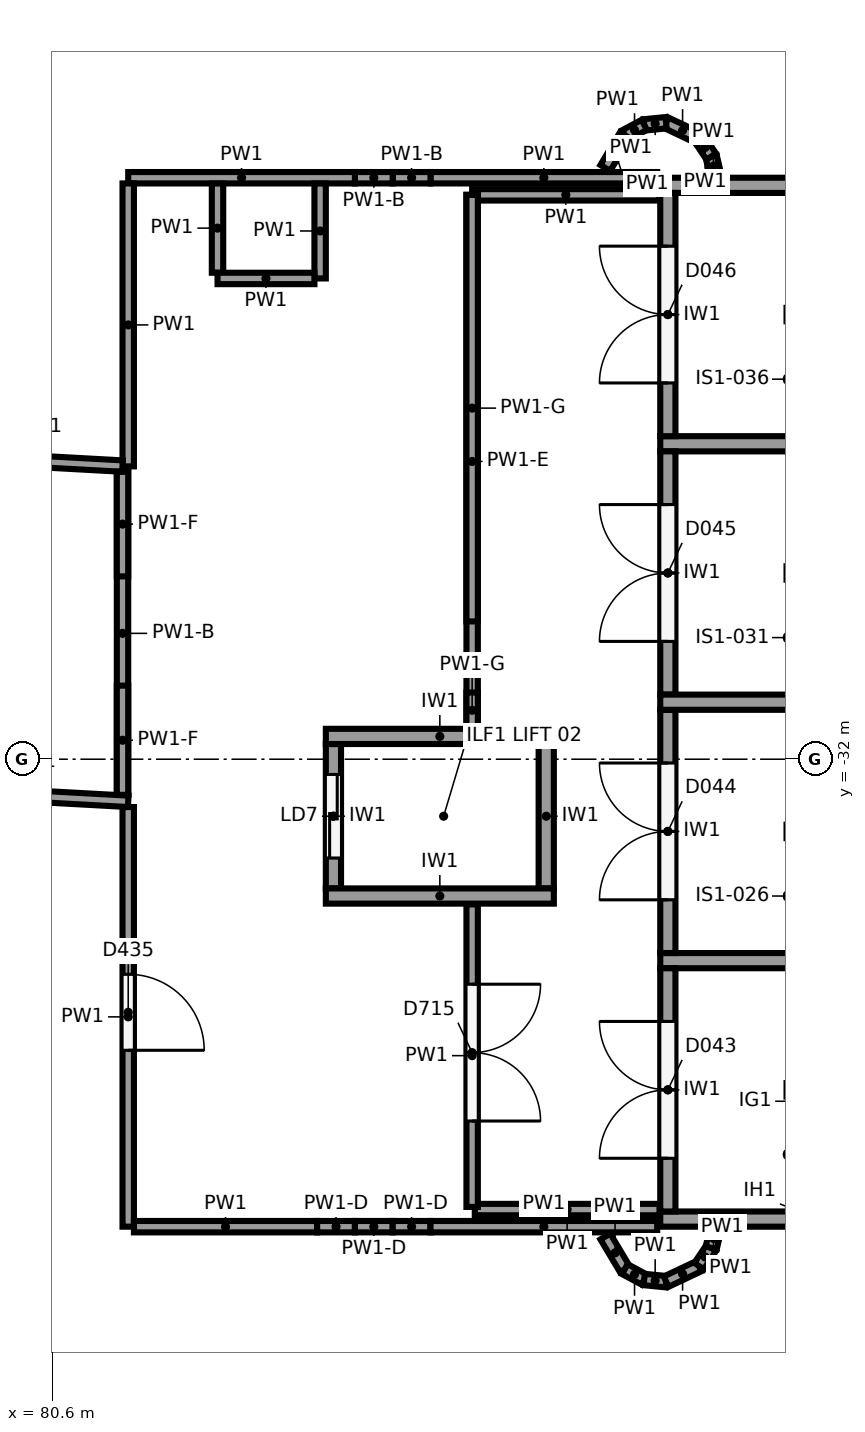
"""IFC4 building model, lengths in metres.
Left out: names, types, materials, properties, quantities, classifications, styles, units other than length and angle.
Written with IfcOpenShell. Run it as: python <this file> out.ifc"""

import sys

from ifc_helpers import new_model, si_unit, direction, frame, frame_2d, origin, origin_2d, place, context, subcontext, project, spatial, rectangle, circle, extrude, element, fill, save


model = new_model("IFC4")
c1 = context("Model", 3, precision=1e-05, world=origin(), true_north=direction((0.0, 1.0)))
c2 = subcontext(c1, "Body", "Model", "MODEL_VIEW")
j1 = project(units=[si_unit("LENGTHUNIT", "METRE"), si_unit("PLANEANGLEUNIT", "RADIAN")], contexts=[c1])
p1 = place(None, origin())
s1 = spatial("IfcSite", under=j1, at=p1, CompositionType="ELEMENT")
p2 = place(p1, origin())
s2 = spatial("IfcBuilding", under=s1, at=p2, CompositionType="ELEMENT")
p3 = place(p2, frame((0.0, 0.0, -4.0)))
s3 = spatial("IfcBuildingStorey", under=s2, at=p3, CompositionType="ELEMENT", Elevation=-4.0)
p4 = place(p3, frame((84.941, -30.404, -1.2), z_axis=(0.0, 0.0, 1.0), x_axis=(1.0, 0.0, 0.0)))
e1 = element("IfcColumn", 1, at=p4, inside=s3, PredefinedType="COLUMN", context=c2, shape_type="SweptSolid", body=[
    extrude(circle(Radius=0.6, at=origin_2d()), origin(), (0.0, 0.0, 1.0), 5.2),
])
for number, where, z_axis, x_axis in (
    (2, (97.6, -38.05, -1.2), (0.0, 0.0, 1.0), (-1.0, 0.0, 0.0)),
    (3, (97.6, -31.25, -1.2), (0.0, 0.0, 1.0), (-1.0, 0.0, 0.0)),
    (4, (97.6, -24.45, -1.2), (0.0, 0.0, 1.0), (-1.0, 0.0, 0.0)),
    (5, (97.6, -34.65, -1.2), (0.0, 0.0, 1.0), (-1.0, 0.0, 0.0)),
    (6, (97.6, -27.85, -1.2), (0.0, 0.0, 1.0), (-1.0, 0.0, 0.0)),
):
    element("IfcWall", number, at=place(p3, frame(where, z_axis=z_axis, x_axis=x_axis)), inside=s3, PredefinedType="SHEAR", context=c2, shape_type="SweptSolid", body=[
        extrude(rectangle(XDim=9.0, YDim=0.2, at=frame_2d((4.5, 0.0))), origin(), (0.0, 0.0, 1.0), 4.8),
    ])
p5 = place(p3, frame((88.7, -37.95, -1.2), z_axis=(0.0, 0.0, 1.0), x_axis=(0.0, 1.0, 0.0)))
e7 = element("IfcWall", 7, at=p5, inside=s3, PredefinedType="SHEAR", context=c2, shape_type="SweptSolid", body=[
    extrude(rectangle(XDim=3.2, YDim=0.2, at=frame_2d((1.6, 0.0))), origin(), (0.0, 0.0, 1.0), 4.8),
])
p6 = place(p5, frame((0.7, 0.0, 1.2)))
e8 = element("IfcOpeningElement", 8, at=p6, cuts=e7, PredefinedType="OPENING", context=c2, shape_type="SweptSolid", body=[
    extrude(rectangle(XDim=1.8, YDim=2.1, at=frame_2d((0.9, 1.05))), frame((0.0, 0.11, 0.0), z_axis=(0.0, -1.0, 0.0), x_axis=(1.0, 0.0, 0.0)), (0.0, 0.0, 1.0), 0.22),
])
p7 = place(p3, frame((88.7, -34.55, -1.2), z_axis=(0.0, 0.0, 1.0), x_axis=(0.0, 1.0, 0.0)))
e9 = element("IfcWall", 9, at=p7, inside=s3, PredefinedType="SHEAR", context=c2, shape_type="SweptSolid", body=[
    extrude(rectangle(XDim=3.2, YDim=0.2, at=frame_2d((1.6, 0.0))), origin(), (0.0, 0.0, 1.0), 4.8),
])
p8 = place(p7, frame((0.7, 0.0, 1.2)))
e10 = element("IfcOpeningElement", 10, at=p8, cuts=e9, PredefinedType="OPENING", context=c2, shape_type="SweptSolid", body=[
    extrude(rectangle(XDim=1.8, YDim=2.1, at=frame_2d((0.9, 1.05))), frame((0.0, 0.11, 0.0), z_axis=(0.0, -1.0, 0.0), x_axis=(1.0, 0.0, 0.0)), (0.0, 0.0, 1.0), 0.22),
])
p9 = place(p3, frame((88.7, -31.15, -1.2), z_axis=(0.0, 0.0, 1.0), x_axis=(0.0, 1.0, 0.0)))
e11 = element("IfcWall", 11, at=p9, inside=s3, PredefinedType="SHEAR", context=c2, shape_type="SweptSolid", body=[
    extrude(rectangle(XDim=3.2, YDim=0.2, at=frame_2d((1.6, 0.0))), origin(), (0.0, 0.0, 1.0), 4.8),
])
p10 = place(p9, frame((0.7, 0.0, 1.2)))
e12 = element("IfcOpeningElement", 12, at=p10, cuts=e11, PredefinedType="OPENING", context=c2, shape_type="SweptSolid", body=[
    extrude(rectangle(XDim=1.8, YDim=2.1, at=frame_2d((0.9, 1.05))), frame((0.0, 0.11, 0.0), z_axis=(0.0, -1.0, 0.0), x_axis=(1.0, 0.0, 0.0)), (0.0, 0.0, 1.0), 0.22),
])
p11 = place(p3, frame((88.7, -27.75, -1.2), z_axis=(0.0, 0.0, 1.0), x_axis=(0.0, 1.0, 0.0)))
e13 = element("IfcWall", 13, at=p11, inside=s3, PredefinedType="SHEAR", context=c2, shape_type="SweptSolid", body=[
    extrude(rectangle(XDim=3.2, YDim=0.2, at=frame_2d((1.6, 0.0))), origin(), (0.0, 0.0, 1.0), 4.8),
])
p12 = place(p11, frame((0.7, 0.0, 1.2)))
e14 = element("IfcOpeningElement", 14, at=p12, cuts=e13, PredefinedType="OPENING", context=c2, shape_type="SweptSolid", body=[
    extrude(rectangle(XDim=1.8, YDim=2.1, at=frame_2d((0.9, 1.05))), frame((0.0, 0.11, 0.0), z_axis=(0.0, -1.0, 0.0), x_axis=(1.0, 0.0, 0.0)), (0.0, 0.0, 1.0), 0.22),
])
for number, where, z_axis, x_axis in (
    (15, (87.2, -33.8, -1.2), (0.0, 0.0, 1.0), (-1.0, 0.0, 0.0)),
    (16, (87.2, -31.7, -1.2), (0.0, 0.0, 1.0), (-1.0, 0.0, 0.0)),
):
    element("IfcWall", number, at=place(p3, frame(where, z_axis=z_axis, x_axis=x_axis)), inside=s3, PredefinedType="SHEAR", context=c2, shape_type="SweptSolid", body=[
        extrude(rectangle(XDim=3.0, YDim=0.2, at=frame_2d((1.5, 0.0))), origin(), (0.0, 0.0, 1.0), 4.8),
    ])
p13 = place(p3, frame((87.1, -33.7, -1.2), z_axis=(0.0, 0.0, 1.0), x_axis=(0.0, 1.0, 0.0)))
e17 = element("IfcWall", 17, at=p13, inside=s3, PredefinedType="SHEAR", context=c2, shape_type="SweptSolid", body=[
    extrude(rectangle(XDim=1.9, YDim=0.2, at=frame_2d((0.95, 0.0))), origin(), (0.0, 0.0, 1.0), 4.8),
])
p14 = place(p3, frame((84.3, -33.7, -1.2), z_axis=(0.0, 0.0, 1.0), x_axis=(0.0, 1.0, 0.0)))
e18 = element("IfcWall", 18, at=p14, inside=s3, PredefinedType="SHEAR", context=c2, shape_type="SweptSolid", body=[
    extrude(rectangle(XDim=1.9, YDim=0.2, at=frame_2d((0.95, 0.0))), origin(), (0.0, 0.0, 1.0), 4.8),
])
p15 = place(p14, frame((0.4, 0.0, 1.2)))
e19 = element("IfcOpeningElement", 19, at=p15, cuts=e18, PredefinedType="OPENING", context=c2, shape_type="SweptSolid", body=[
    extrude(rectangle(XDim=1.1, YDim=2.1, at=frame_2d((0.55, 1.05))), frame((0.0, 0.11, 0.0), z_axis=(0.0, -1.0, 0.0), x_axis=(1.0, 0.0, 0.0)), (0.0, 0.0, 1.0), 0.22),
])
p16 = place(p3, frame((79.122, -32.418, 0.0), z_axis=(0.0, 0.0, 1.0), x_axis=(0.998497362752, -0.05479978629, 0.0)))
e20 = element("IfcWall", 20, at=p16, inside=s3, PredefinedType="PARTITIONING", context=c2, shape_type="SweptSolid", body=[
    extrude(rectangle(XDim=2.481, YDim=0.15, at=frame_2d((1.241, 0.0))), origin(), (0.0, 0.0, 1.0), 3.6),
])
p17 = place(p3, frame((81.6, -32.629, 0.0), z_axis=(0.0, 0.0, 1.0), x_axis=(0.0, -1.0, 0.0)))
e21 = element("IfcWall", 21, at=p17, inside=s3, PredefinedType="PARTITIONING", context=c2, shape_type="SweptSolid", body=[
    extrude(rectangle(XDim=5.521, YDim=0.15, at=frame_2d((2.76, 0.0))), origin(), (0.0, 0.0, 1.0), 3.6),
])
p18 = place(p17, frame((2.2, 0.0, 0.0)))
e22 = element("IfcOpeningElement", 22, at=p18, cuts=e21, PredefinedType="OPENING", context=c2, shape_type="SweptSolid", body=[
    extrude(rectangle(XDim=1.0, YDim=2.1, at=frame_2d((0.5, 1.05))), frame((0.0, 0.085, 0.0), z_axis=(0.0, -1.0, 0.0), x_axis=(1.0, 0.0, 0.0)), (0.0, 0.0, 1.0), 0.17),
])
p19 = place(p3, frame((81.675, -38.15, 0.0), z_axis=(0.0, 0.0, 1.0), x_axis=(1.0, 0.0, 0.0)))
e23 = element("IfcWall", 23, at=p19, inside=s3, PredefinedType="PARTITIONING", context=c2, shape_type="SweptSolid", body=[
    extrude(rectangle(XDim=2.411, YDim=0.15, at=frame_2d((1.205, 0.0))), origin(), (0.0, 0.0, 1.0), 3.6),
])
p20 = place(p3, frame((84.086, -38.15, 0.0), z_axis=(0.0, 0.0, 1.0), x_axis=(1.0, 0.0, 0.0)))
e24 = element("IfcWall", 24, at=p20, inside=s3, PredefinedType="PARTITIONING", context=c2, shape_type="SweptSolid", body=[
    extrude(rectangle(XDim=0.497, YDim=0.15, at=frame_2d((0.249, 0.0))), origin(), (0.0, 0.0, 1.0), 2.3),
])
for number, where, z_axis, x_axis in (
    (25, (84.583, -38.15, 0.0), (0.0, 0.0, 1.0), (1.0, 0.0, 0.0)),
    (26, (85.08, -38.15, 0.0), (0.0, 0.0, 1.0), (1.0, 0.0, 0.0)),
):
    element("IfcWall", number, at=place(p3, frame(where, z_axis=z_axis, x_axis=x_axis)), inside=s3, PredefinedType="PARTITIONING", context=c2, shape_type="SweptSolid", body=[
        extrude(rectangle(XDim=0.497, YDim=0.15, at=frame_2d((0.249, 0.0))), origin(), (0.0, 0.0, 1.0), 2.3),
    ])
for number, where, z_axis, x_axis in (
    (27, (85.577, -38.15, 0.0), (0.0, 0.0, 1.0), (1.0, 0.0, 0.0)),
    (28, (88.56, -24.35, 0.0), (0.0, 0.0, 1.0), (-1.0, 0.0, 0.0)),
):
    element("IfcWall", number, at=place(p3, frame(where, z_axis=z_axis, x_axis=x_axis)), inside=s3, PredefinedType="PARTITIONING", context=c2, shape_type="SweptSolid", body=[
        extrude(rectangle(XDim=2.983, YDim=0.15, at=frame_2d((1.491, 0.0))), origin(), (0.0, 0.0, 1.0), 3.6),
    ])
for number, where, z_axis, x_axis in (
    (29, (85.577, -24.35, 0.0), (0.0, 0.0, 1.0), (-1.0, 0.0, 0.0)),
    (30, (85.08, -24.35, 0.0), (0.0, 0.0, 1.0), (-1.0, 0.0, 0.0)),
):
    element("IfcWall", number, at=place(p3, frame(where, z_axis=z_axis, x_axis=x_axis)), inside=s3, PredefinedType="PARTITIONING", context=c2, shape_type="SweptSolid", body=[
        extrude(rectangle(XDim=0.497, YDim=0.15, at=frame_2d((0.249, 0.0))), origin(), (0.0, 0.0, 1.0), 2.5),
    ])
p21 = place(p3, frame((84.583, -24.35, 0.0), z_axis=(0.0, 0.0, 1.0), x_axis=(-1.0, 0.0, 0.0)))
e31 = element("IfcWall", 31, at=p21, inside=s3, PredefinedType="PARTITIONING", context=c2, shape_type="SweptSolid", body=[
    extrude(rectangle(XDim=2.983, YDim=0.15, at=frame_2d((1.491, 0.0))), origin(), (0.0, 0.0, 1.0), 3.6),
])
p22 = place(p3, frame((81.6, -24.425, 0.0), z_axis=(0.0, 0.0, 1.0), x_axis=(0.0, -1.0, 0.0)))
e32 = element("IfcWall", 32, at=p22, inside=s3, PredefinedType="PARTITIONING", context=c2, shape_type="SweptSolid", body=[
    extrude(rectangle(XDim=3.723, YDim=0.15, at=frame_2d((1.861, 0.0))), origin(), (0.0, 0.0, 1.0), 3.6),
])
p23 = place(p3, frame((81.525, -28.144, 0.0), z_axis=(0.0, 0.0, 1.0), x_axis=(-0.998497253929, 0.054801769103, 0.0)))
e33 = element("IfcWall", 33, at=p23, inside=s3, PredefinedType="PARTITIONING", context=c2, shape_type="SweptSolid", body=[
    extrude(rectangle(XDim=2.165, YDim=0.15, at=frame_2d((1.083, 0.0))), origin(), (0.0, 0.0, 1.0), 3.6),
])
p24 = place(p3, frame((84.125, -25.675, 0.0), z_axis=(0.0, 0.0, 1.0), x_axis=(0.0, 1.0, 0.0)))
e34 = element("IfcWall", 34, at=p24, inside=s3, PredefinedType="PARTITIONING", context=c2, shape_type="SweptSolid", body=[
    extrude(rectangle(XDim=1.249, YDim=0.15, at=frame_2d((0.625, 0.0))), origin(), (0.0, 0.0, 1.0), 3.6),
])
p25 = place(p3, frame((82.775, -24.426, 0.0), z_axis=(0.0, 0.0, 1.0), x_axis=(0.0, -1.0, 0.0)))
e35 = element("IfcWall", 35, at=p25, inside=s3, PredefinedType="PARTITIONING", context=c2, shape_type="SweptSolid", body=[
    extrude(rectangle(XDim=1.174, YDim=0.15, at=frame_2d((0.587, 0.0))), origin(), (0.0, 0.0, 1.0), 3.6),
])
p26 = place(p3, frame((82.775, -25.675, 0.0), z_axis=(0.0, 0.0, 1.0), x_axis=(1.0, 0.0, 0.0)))
e36 = element("IfcWall", 36, at=p26, inside=s3, PredefinedType="PARTITIONING", context=c2, shape_type="SweptSolid", body=[
    extrude(rectangle(XDim=1.275, YDim=0.15, at=frame_2d((0.638, 0.0))), origin(), (0.0, 0.0, 1.0), 3.6),
])
p27 = place(p3, frame((86.16, -37.925, 0.0), z_axis=(0.0, 0.0, 1.0), x_axis=(1.0, 0.0, 0.0)))
e37 = element("IfcWall", 37, at=p27, inside=s3, PredefinedType="PARTITIONING", context=c2, shape_type="SweptSolid", body=[
    extrude(rectangle(XDim=2.43, YDim=0.15, at=frame_2d((1.215, 0.0))), origin(), (0.0, 0.0, 1.0), 3.6),
])
p28 = place(p3, frame((88.59, -24.575, 0.0), z_axis=(0.0, 0.0, 1.0), x_axis=(-1.0, 0.0, 0.0)))
e38 = element("IfcWall", 38, at=p28, inside=s3, PredefinedType="PARTITIONING", context=c2, shape_type="SweptSolid", body=[
    extrude(rectangle(XDim=2.465, YDim=0.15, at=frame_2d((1.232, 0.0))), origin(), (0.0, 0.0, 1.0), 3.6),
])
p29 = place(p3, frame((86.125, -24.575, 0.0), z_axis=(0.0, 0.0, 1.0), x_axis=(0.0, -1.0, 0.0)))
e39 = element("IfcWall", 39, at=p29, inside=s3, PredefinedType="PARTITIONING", context=c2, shape_type="SweptSolid", body=[
    extrude(rectangle(XDim=7.015, YDim=0.15, at=frame_2d((3.508, 0.0))), origin(), (0.0, 0.0, 1.0), 2.85),
])
p30 = place(p3, frame((86.125, -24.575, 2.85), z_axis=(0.0, 0.0, 1.0), x_axis=(0.0, -1.0, 0.0)))
e40 = element("IfcWall", 40, at=p30, inside=s3, PredefinedType="PARTITIONING", context=c2, shape_type="SweptSolid", body=[
    extrude(rectangle(XDim=5.612, YDim=0.15, at=frame_2d((2.806, 0.0))), origin(), (0.0, 0.0, 1.0), 0.75),
])
p31 = place(p3, frame((86.125, -31.122, 2.85), z_axis=(0.0, 0.0, 1.0), x_axis=(0.0, -1.0, 0.0)))
e41 = element("IfcWall", 41, at=p31, inside=s3, PredefinedType="PARTITIONING", context=c2, shape_type="SweptSolid", body=[
    extrude(rectangle(XDim=0.468, YDim=0.15, at=frame_2d((0.234, 0.0))), origin(), (0.0, 0.0, 1.0), 0.75),
])
p32 = place(p3, frame((86.125, -33.91, 0.0), z_axis=(0.0, 0.0, 1.0), x_axis=(0.0, -1.0, 0.0)))
e42 = element("IfcWall", 42, at=p32, inside=s3, PredefinedType="PARTITIONING", context=c2, shape_type="SweptSolid", body=[
    extrude(rectangle(XDim=3.98, YDim=0.15, at=frame_2d((1.99, 0.0))), origin(), (0.0, 0.0, 1.0), 3.6),
])
p33 = place(p32, frame((1.05, 0.0, 0.0)))
e43 = element("IfcOpeningElement", 43, at=p33, cuts=e42, PredefinedType="OPENING", context=c2, shape_type="SweptSolid", body=[
    extrude(rectangle(XDim=1.8, YDim=2.1, at=frame_2d((0.9, 1.05))), frame((0.0, 0.085, 0.0), z_axis=(0.0, -1.0, 0.0), x_axis=(1.0, 0.0, 0.0)), (0.0, 0.0, 1.0), 0.17),
])
p34 = place(p3, frame((81.525, -28.219, 0.0), z_axis=(0.0, 0.0, 1.0), x_axis=(0.0, -1.0, 0.0)))
e44 = element("IfcWall", 44, at=p34, inside=s3, PredefinedType="PARTITIONING", context=c2, shape_type="SweptSolid", body=[
    extrude(rectangle(XDim=4.25, YDim=0.15, at=frame_2d((2.125, 0.0))), origin(), (0.0, 0.0, 1.0), 2.5),
])
p35 = place(p3, frame((81.525, -28.219, 2.5), z_axis=(0.0, 0.0, 1.0), x_axis=(0.0, -1.0, 0.0)))
e45 = element("IfcWall", 45, at=p35, inside=s3, PredefinedType="PARTITIONING", context=c2, shape_type="SweptSolid", body=[
    extrude(rectangle(XDim=1.375, YDim=0.15, at=frame_2d((0.688, 0.0))), origin(), (0.0, 0.0, 1.0), 1.1),
])
p36 = place(p3, frame((81.525, -31.032, 2.5), z_axis=(0.0, 0.0, 1.0), x_axis=(0.0, -1.0, 0.0)))
e46 = element("IfcWall", 46, at=p36, inside=s3, PredefinedType="PARTITIONING", context=c2, shape_type="SweptSolid", body=[
    extrude(rectangle(XDim=1.437, YDim=0.15, at=frame_2d((0.719, 0.0))), origin(), (0.0, 0.0, 1.0), 1.1),
])
p37 = place(p3, frame((87.877, -38.279, 0.0), z_axis=(0.0, 0.0, 1.0), x_axis=(0.513060623194, -0.858352373404, 0.0)))
e47 = element("IfcWall", 47, at=p37, inside=s3, PredefinedType="PARTITIONING", context=c2, shape_type="SweptSolid", body=[
    extrude(rectangle(XDim=0.5, YDim=0.15, at=frame_2d((0.25, 0.0))), origin(), (0.0, 0.0, 1.0), 3.6),
])
for number, where, z_axis, x_axis in (
    (48, (88.134, -38.709, 0.0), (0.0, 0.0, 1.0), (0.882, -0.472, 0.0)),
    (49, (88.389, -38.845, 0.0), (0.0, 0.0, 1.0), (0.995, -0.098, 0.0)),
):
    element("IfcWall", number, at=place(p3, frame(where, z_axis=z_axis, x_axis=x_axis)), inside=s3, PredefinedType="PARTITIONING", context=c2, shape_type="SweptSolid", body=[
        extrude(rectangle(XDim=0.289, YDim=0.15, at=frame_2d((0.145, 0.0))), origin(), (0.0, 0.0, 1.0), 3.6),
    ])
p38 = place(p3, frame((88.677, -38.874, 0.0), z_axis=(0.0, 0.0, 1.0), x_axis=(0.90398642908, 0.427561148889, 0.0)))
e50 = element("IfcWall", 50, at=p38, inside=s3, PredefinedType="PARTITIONING", context=c2, shape_type="SweptSolid", body=[
    extrude(rectangle(XDim=0.48, YDim=0.15, at=frame_2d((0.24, 0.0))), origin(), (0.0, 0.0, 1.0), 3.6),
])
p39 = place(p3, frame((89.111, -38.668, 0.0), z_axis=(0.0, 0.0, 1.0), x_axis=(0.555678694372, 0.831397130511, 0.0)))
e51 = element("IfcWall", 51, at=p39, inside=s3, PredefinedType="PARTITIONING", context=c2, shape_type="SweptSolid", body=[
    extrude(rectangle(XDim=0.288, YDim=0.15, at=frame_2d((0.144, 0.0))), origin(), (0.0, 0.0, 1.0), 3.6),
])
for number, where, z_axis, x_axis in (
    (52, (89.271, -38.429, 0.0), (0.0, 0.0, 1.0), (0.23, 0.973, 0.0)),
    (53, (89.33, -24.322, 0.0), (0.0, 0.0, 1.0), (-0.23, 0.973, 0.0)),
):
    element("IfcWall", number, at=place(p3, frame(where, z_axis=z_axis, x_axis=x_axis)), inside=s3, PredefinedType="PARTITIONING", context=c2, shape_type="SweptSolid", body=[
        extrude(rectangle(XDim=0.258, YDim=0.15, at=frame_2d((0.129, 0.0))), origin(), (0.0, 0.0, 1.0), 3.6),
    ])
p40 = place(p3, frame((89.271, -24.071, 0.0), z_axis=(0.0, 0.0, 1.0), x_axis=(-0.555678694372, 0.831397130511, 0.0)))
e54 = element("IfcWall", 54, at=p40, inside=s3, PredefinedType="PARTITIONING", context=c2, shape_type="SweptSolid", body=[
    extrude(rectangle(XDim=0.288, YDim=0.15, at=frame_2d((0.144, 0.0))), origin(), (0.0, 0.0, 1.0), 3.6),
])
p41 = place(p3, frame((89.111, -23.832, 0.0), z_axis=(0.0, 0.0, 1.0), x_axis=(-0.90398642908, 0.427561148889, 0.0)))
e55 = element("IfcWall", 55, at=p41, inside=s3, PredefinedType="PARTITIONING", context=c2, shape_type="SweptSolid", body=[
    extrude(rectangle(XDim=0.48, YDim=0.15, at=frame_2d((0.24, 0.0))), origin(), (0.0, 0.0, 1.0), 3.6),
])
for number, where, z_axis, x_axis in (
    (56, (88.677, -23.626, 0.0), (0.0, 0.0, 1.0), (-0.995, -0.098, 0.0)),
    (57, (88.389, -23.655, 0.0), (0.0, 0.0, 1.0), (-0.882, -0.472, 0.0)),
):
    element("IfcWall", number, at=place(p3, frame(where, z_axis=z_axis, x_axis=x_axis)), inside=s3, PredefinedType="PARTITIONING", context=c2, shape_type="SweptSolid", body=[
        extrude(rectangle(XDim=0.289, YDim=0.15, at=frame_2d((0.145, 0.0))), origin(), (0.0, 0.0, 1.0), 3.6),
    ])
p42 = place(p3, frame((88.134, -23.791, 0.0), z_axis=(0.0, 0.0, 1.0), x_axis=(-0.513060623194, -0.858352373404, 0.0)))
e58 = element("IfcWall", 58, at=p42, inside=s3, PredefinedType="PARTITIONING", context=c2, shape_type="SweptSolid", body=[
    extrude(rectangle(XDim=0.5, YDim=0.15, at=frame_2d((0.25, 0.0))), origin(), (0.0, 0.0, 1.0), 3.6),
])
p43 = place(p6, origin())
e59 = element("IfcDoor", 59, at=p43, inside=s3, OperationType="DOUBLE_DOOR_SINGLE_SWING", PredefinedType="DOOR", context=c2, shape_type="SweptSolid", body=[
    extrude(rectangle(XDim=1.8, YDim=2.1, at=frame_2d((0.9, 1.05))), frame((0.0, 0.025, 0.0), z_axis=(0.0, -1.0, 0.0), x_axis=(1.0, 0.0, 0.0)), (0.0, 0.0, 1.0), 0.05),
])
fill(e8, e59)
p44 = place(p8, origin())
e60 = element("IfcDoor", 60, at=p44, inside=s3, OperationType="DOUBLE_DOOR_SINGLE_SWING", PredefinedType="DOOR", context=c2, shape_type="SweptSolid", body=[
    extrude(rectangle(XDim=1.8, YDim=2.1, at=frame_2d((0.9, 1.05))), frame((0.0, 0.025, 0.0), z_axis=(0.0, -1.0, 0.0), x_axis=(1.0, 0.0, 0.0)), (0.0, 0.0, 1.0), 0.05),
])
fill(e10, e60)
p45 = place(p10, origin())
e61 = element("IfcDoor", 61, at=p45, inside=s3, OperationType="DOUBLE_DOOR_SINGLE_SWING", PredefinedType="DOOR", context=c2, shape_type="SweptSolid", body=[
    extrude(rectangle(XDim=1.8, YDim=2.1, at=frame_2d((0.9, 1.05))), frame((0.0, 0.025, 0.0), z_axis=(0.0, -1.0, 0.0), x_axis=(1.0, 0.0, 0.0)), (0.0, 0.0, 1.0), 0.05),
])
fill(e12, e61)
p46 = place(p12, origin())
e62 = element("IfcDoor", 62, at=p46, inside=s3, OperationType="DOUBLE_DOOR_SINGLE_SWING", PredefinedType="DOOR", context=c2, shape_type="SweptSolid", body=[
    extrude(rectangle(XDim=1.8, YDim=2.1, at=frame_2d((0.9, 1.05))), frame((0.0, 0.025, 0.0), z_axis=(0.0, -1.0, 0.0), x_axis=(1.0, 0.0, 0.0)), (0.0, 0.0, 1.0), 0.05),
])
fill(e14, e62)
p47 = place(p15, origin())
e63 = element("IfcDoor", 63, at=p47, inside=s3, OperationType="SLIDING_TO_LEFT", PredefinedType="DOOR", context=c2, shape_type="SweptSolid", body=[
    extrude(rectangle(XDim=1.1, YDim=2.1, at=frame_2d((0.55, 1.05))), frame((0.0, 0.025, 0.0), z_axis=(0.0, -1.0, 0.0), x_axis=(1.0, 0.0, 0.0)), (0.0, 0.0, 1.0), 0.05),
])
fill(e19, e63)
p48 = place(p18, origin())
e64 = element("IfcDoor", 64, at=p48, inside=s3, OperationType="SINGLE_SWING_RIGHT", PredefinedType="DOOR", context=c2, shape_type="SweptSolid", body=[
    extrude(rectangle(XDim=1.0, YDim=2.1, at=frame_2d((0.5, 1.05))), frame((0.0, 0.025, 0.0), z_axis=(0.0, -1.0, 0.0), x_axis=(1.0, 0.0, 0.0)), (0.0, 0.0, 1.0), 0.05),
])
fill(e22, e64)
p49 = place(p33, origin())
e65 = element("IfcDoor", 65, at=p49, inside=s3, OperationType="DOUBLE_DOOR_SINGLE_SWING", PredefinedType="DOOR", context=c2, shape_type="SweptSolid", body=[
    extrude(rectangle(XDim=1.8, YDim=2.1, at=frame_2d((0.9, 1.05))), frame((0.0, 0.025, 0.0), z_axis=(0.0, -1.0, 0.0), x_axis=(1.0, 0.0, 0.0)), (0.0, 0.0, 1.0), 0.05),
])
fill(e43, e65)
save(model, sys.argv[1])
